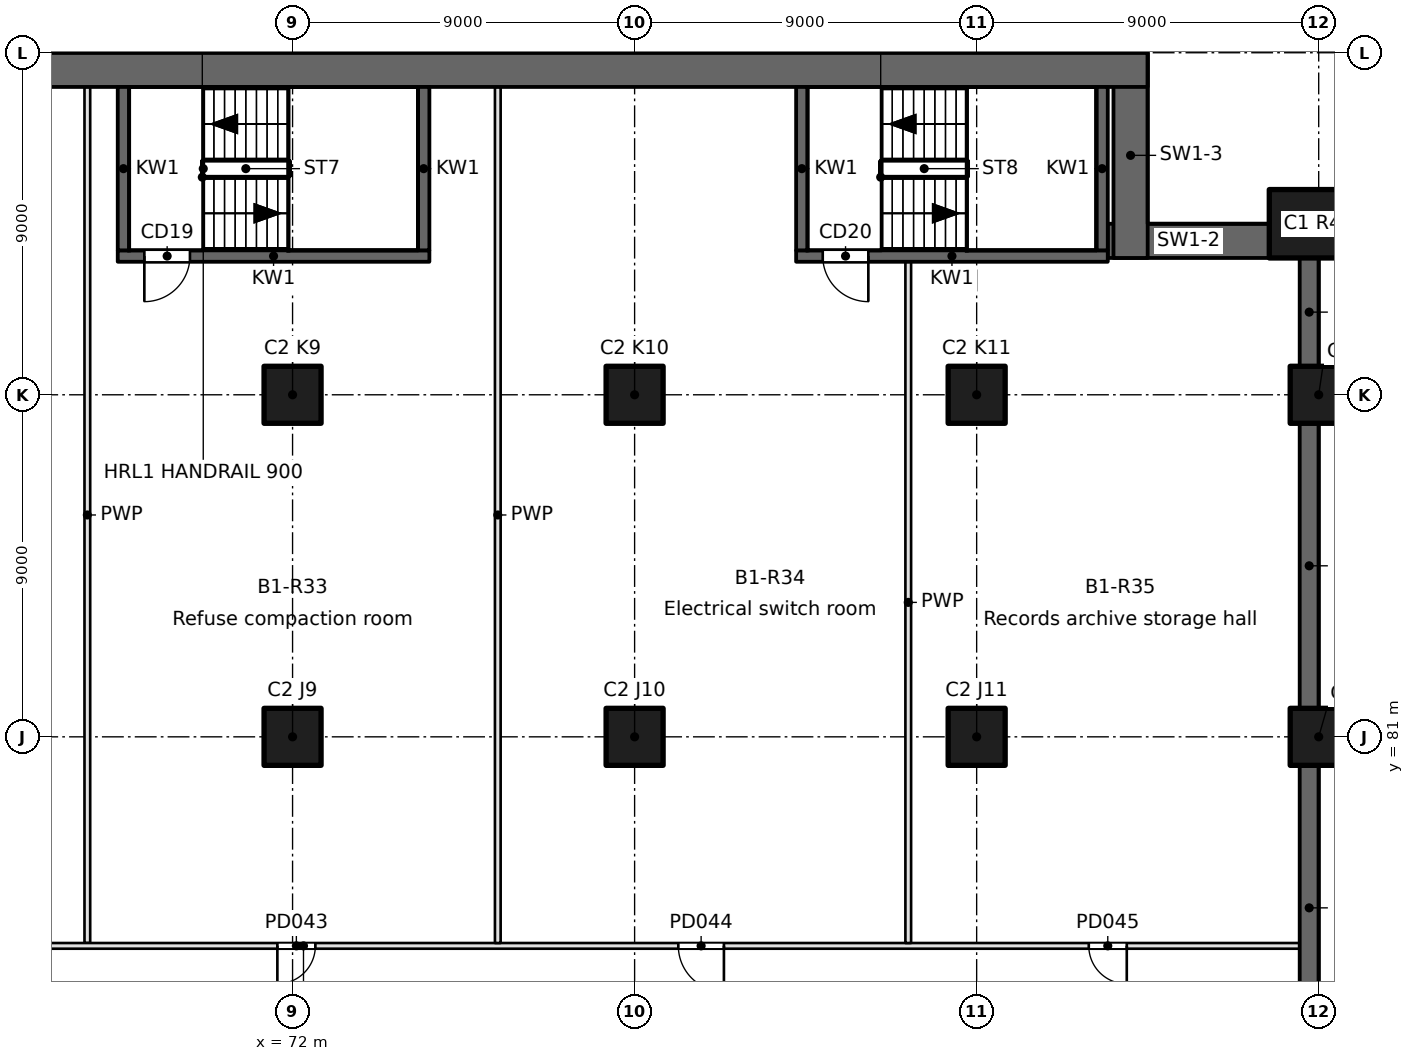
"""IFC4 building model, lengths in metres.
Left out: names, types, materials, properties, quantities, classifications, styles, units other than length and angle.
Written with IfcOpenShell. Run it as: python <this file> out.ifc"""

import sys

from ifc_helpers import new_model, si_unit, direction, frame, frame_2d, origin, origin_2d, place, context, subcontext, project, spatial, rectangle, extrude, element, fill, save


model = new_model("IFC4")
c1 = context("Model", 3, precision=1e-05, world=origin(), true_north=direction((0.0, 1.0)))
c2 = subcontext(c1, "Body", "Model", "MODEL_VIEW")
j1 = project(units=[si_unit("LENGTHUNIT", "METRE"), si_unit("PLANEANGLEUNIT", "RADIAN")], contexts=[c1])
p1 = place(None, origin())
s1 = spatial("IfcSite", under=j1, at=p1, CompositionType="ELEMENT")
p2 = place(p1, origin())
s2 = spatial("IfcBuilding", under=s1, at=p2, CompositionType="ELEMENT")
p3 = place(p2, frame((0.0, 0.0, -6.0)))
s3 = spatial("IfcBuildingStorey", under=s2, at=p3, CompositionType="ELEMENT", Elevation=-6.0)
for number, where, z_axis, x_axis in (
    (1, (99.0, 81.0, -0.6), (0.0, 0.0, 1.0), (1.0, 0.0, 0.0)),
    (2, (99.0, 90.0, -0.6), (0.0, 0.0, 1.0), (1.0, 0.0, 0.0)),
):
    element("IfcColumn", number, at=place(p3, frame(where, z_axis=z_axis, x_axis=x_axis)), inside=s3, PredefinedType="COLUMN", context=c2, shape_type="SweptSolid", body=[
        extrude(rectangle(XDim=1.5, YDim=1.5, at=origin_2d()), origin(), (0.0, 0.0, 1.0), 6.6),
    ])
p4 = place(p3, frame((99.0, 94.5, -0.6), z_axis=(0.0, 0.0, 1.0), x_axis=(1.0, 0.0, 0.0)))
e3 = element("IfcColumn", 3, at=p4, inside=s3, PredefinedType="COLUMN", context=c2, shape_type="SweptSolid", body=[
    extrude(rectangle(XDim=2.6, YDim=1.8, at=origin_2d()), origin(), (0.0, 0.0, 1.0), 6.6),
])
for number, where, z_axis, x_axis in (
    (4, (72.0, 81.0, -0.6), (0.0, 0.0, 1.0), (1.0, 0.0, 0.0)),
    (5, (72.0, 90.0, -0.6), (0.0, 0.0, 1.0), (1.0, 0.0, 0.0)),
    (6, (81.0, 81.0, -0.6), (0.0, 0.0, 1.0), (1.0, 0.0, 0.0)),
    (7, (81.0, 90.0, -0.6), (0.0, 0.0, 1.0), (1.0, 0.0, 0.0)),
    (8, (90.0, 81.0, -0.6), (0.0, 0.0, 1.0), (1.0, 0.0, 0.0)),
    (9, (90.0, 90.0, -0.6), (0.0, 0.0, 1.0), (1.0, 0.0, 0.0)),
):
    element("IfcColumn", number, at=place(p3, frame(where, z_axis=z_axis, x_axis=x_axis)), inside=s3, PredefinedType="COLUMN", context=c2, shape_type="SweptSolid", body=[
        extrude(rectangle(XDim=1.5, YDim=1.5, at=origin_2d()), origin(), (0.0, 0.0, 1.0), 6.6),
    ])
p5 = place(p3, frame((97.7, 94.05, 0.0), z_axis=(0.0, 0.0, 1.0), x_axis=(-1.0, 0.0, 0.0)))
e10 = element("IfcWall", 10, at=p5, inside=s3, PredefinedType="SHEAR", context=c2, shape_type="SweptSolid", body=[
    extrude(rectangle(XDim=4.25, YDim=0.9, at=frame_2d((2.125, 0.0))), origin(), (0.0, 0.0, 1.0), 6.0),
])
p6 = place(p3, frame((94.05, 93.6, 0.0), z_axis=(0.0, 0.0, 1.0), x_axis=(0.0, 1.0, 0.0)))
e11 = element("IfcWall", 11, at=p6, inside=s3, PredefinedType="SHEAR", context=c2, shape_type="SweptSolid", body=[
    extrude(rectangle(XDim=5.4, YDim=0.9, at=frame_2d((2.7, 0.0))), origin(), (0.0, 0.0, 1.0), 6.0),
])
p7 = place(p3, frame((94.5, 98.55, 0.0), z_axis=(0.0, 0.0, 1.0), x_axis=(-1.0, 0.0, 0.0)))
e12 = element("IfcWall", 12, at=p7, inside=s3, PredefinedType="SHEAR", context=c2, shape_type="SweptSolid", body=[
    extrude(rectangle(XDim=90.0, YDim=0.9, at=frame_2d((45.0, 0.0))), origin(), (0.0, 0.0, 1.0), 6.0),
])
p8 = place(p3, frame((67.4, 93.65, 0.0), z_axis=(0.0, 0.0, 1.0), x_axis=(1.0, 0.0, 0.0)))
e13 = element("IfcWall", 13, at=p8, inside=s3, PredefinedType="SOLIDWALL", context=c2, shape_type="SweptSolid", body=[
    extrude(rectangle(XDim=8.2, YDim=0.3, at=frame_2d((4.1, 0.0))), origin(), (0.0, 0.0, 1.0), 5.6),
])
p9 = place(p8, frame((0.7, 0.0, 0.0)))
e14 = element("IfcOpeningElement", 14, at=p9, cuts=e13, PredefinedType="OPENING", context=c2, shape_type="SweptSolid", body=[
    extrude(rectangle(XDim=1.2, YDim=2.1, at=frame_2d((0.6, 1.05))), frame((0.0, 0.15, 0.0), z_axis=(0.0, -1.0, 0.0), x_axis=(1.0, 0.0, 0.0)), (0.0, 0.0, 1.0), 0.3),
])
p10 = place(p3, frame((85.25, 93.65, 0.0), z_axis=(0.0, 0.0, 1.0), x_axis=(1.0, 0.0, 0.0)))
e15 = element("IfcWall", 15, at=p10, inside=s3, PredefinedType="SOLIDWALL", context=c2, shape_type="SweptSolid", body=[
    extrude(rectangle(XDim=8.2, YDim=0.3, at=frame_2d((4.1, 0.0))), origin(), (0.0, 0.0, 1.0), 5.6),
])
p11 = place(p10, frame((0.7, 0.0, 0.0)))
e16 = element("IfcOpeningElement", 16, at=p11, cuts=e15, PredefinedType="OPENING", context=c2, shape_type="SweptSolid", body=[
    extrude(rectangle(XDim=1.2, YDim=2.1, at=frame_2d((0.6, 1.05))), frame((0.0, 0.15, 0.0), z_axis=(0.0, -1.0, 0.0), x_axis=(1.0, 0.0, 0.0)), (0.0, 0.0, 1.0), 0.3),
])
for number, where, z_axis, x_axis in (
    (17, (67.55, 93.8, 0.0), (0.0, 0.0, 1.0), (0.0, 1.0, 0.0)),
    (18, (75.45, 93.8, 0.0), (0.0, 0.0, 1.0), (0.0, 1.0, 0.0)),
    (19, (85.4, 93.8, 0.0), (0.0, 0.0, 1.0), (0.0, 1.0, 0.0)),
    (20, (93.3, 93.8, 0.0), (0.0, 0.0, 1.0), (0.0, 1.0, 0.0)),
):
    element("IfcWall", number, at=place(p3, frame(where, z_axis=z_axis, x_axis=x_axis)), inside=s3, PredefinedType="SOLIDWALL", context=c2, shape_type="SweptSolid", body=[
        extrude(rectangle(XDim=4.3, YDim=0.3, at=frame_2d((2.15, 0.0))), origin(), (0.0, 0.0, 1.0), 5.6),
    ])
for number, where, z_axis, x_axis in (
    (21, (98.75, 72.75, 0.0), (0.0, 0.0, 1.0), (0.0, 1.0, 0.0)),
    (22, (98.75, 81.75, 0.0), (0.0, 0.0, 1.0), (0.0, 1.0, 0.0)),
):
    element("IfcWall", number, at=place(p3, frame(where, z_axis=z_axis, x_axis=x_axis)), inside=s3, PredefinedType="SOLIDWALL", context=c2, shape_type="SweptSolid", body=[
        extrude(rectangle(XDim=7.5, YDim=0.5, at=frame_2d((3.75, 0.0))), origin(), (0.0, 0.0, 1.0), 5.6),
    ])
p12 = place(p3, frame((98.75, 90.75, 0.0), z_axis=(0.0, 0.0, 1.0), x_axis=(0.0, 1.0, 0.0)))
e23 = element("IfcWall", 23, at=p12, inside=s3, PredefinedType="SOLIDWALL", context=c2, shape_type="SweptSolid", body=[
    extrude(rectangle(XDim=2.85, YDim=0.5, at=frame_2d((1.425, 0.0))), origin(), (0.0, 0.0, 1.0), 5.6),
])
p13 = place(p3, frame((66.6, 75.575, 0.0), z_axis=(0.0, 0.0, 1.0), x_axis=(0.0, 1.0, 0.0)))
e24 = element("IfcWall", 24, at=p13, inside=s3, PredefinedType="PARTITIONING", context=c2, shape_type="SweptSolid", body=[
    extrude(rectangle(XDim=22.525, YDim=0.15, at=frame_2d((11.263, 0.0))), origin(), (0.0, 0.0, 1.0), 5.6),
])
p14 = place(p3, frame((98.7, 75.5, 0.0), z_axis=(0.0, 0.0, 1.0), x_axis=(-1.0, 0.0, 0.0)))
e25 = element("IfcWall", 25, at=p14, inside=s3, PredefinedType="PARTITIONING", context=c2, shape_type="SweptSolid", body=[
    extrude(rectangle(XDim=52.825, YDim=0.15, at=frame_2d((26.413, 0.0))), origin(), (0.0, 0.0, 1.0), 5.6),
])
p15 = place(p14, frame((42.075, 0.0, 0.0)))
e26 = element("IfcOpeningElement", 26, at=p15, cuts=e25, PredefinedType="OPENING", context=c2, shape_type="SweptSolid", body=[
    extrude(rectangle(XDim=1.0, YDim=2.1, at=frame_2d((0.5, 1.05))), frame((0.0, 0.075, 0.0), z_axis=(0.0, -1.0, 0.0), x_axis=(1.0, 0.0, 0.0)), (0.0, 0.0, 1.0), 0.15),
])
p16 = place(p14, frame((26.1, 0.0, 0.0)))
e27 = element("IfcOpeningElement", 27, at=p16, cuts=e25, PredefinedType="OPENING", context=c2, shape_type="SweptSolid", body=[
    extrude(rectangle(XDim=1.0, YDim=2.1, at=frame_2d((0.5, 1.05))), frame((0.0, 0.075, 0.0), z_axis=(0.0, -1.0, 0.0), x_axis=(1.0, 0.0, 0.0)), (0.0, 0.0, 1.0), 0.15),
])
p17 = place(p14, frame((15.35, 0.0, 0.0)))
e28 = element("IfcOpeningElement", 28, at=p17, cuts=e25, PredefinedType="OPENING", context=c2, shape_type="SweptSolid", body=[
    extrude(rectangle(XDim=1.2, YDim=2.1, at=frame_2d((0.6, 1.05))), frame((0.0, 0.075, 0.0), z_axis=(0.0, -1.0, 0.0), x_axis=(1.0, 0.0, 0.0)), (0.0, 0.0, 1.0), 0.15),
])
p18 = place(p14, frame((4.75, 0.0, 0.0)))
e29 = element("IfcOpeningElement", 29, at=p18, cuts=e25, PredefinedType="OPENING", context=c2, shape_type="SweptSolid", body=[
    extrude(rectangle(XDim=1.0, YDim=2.1, at=frame_2d((0.5, 1.05))), frame((0.0, 0.075, 0.0), z_axis=(0.0, -1.0, 0.0), x_axis=(1.0, 0.0, 0.0)), (0.0, 0.0, 1.0), 0.15),
])
p19 = place(p3, frame((77.4, 75.575, 0.0), z_axis=(0.0, 0.0, 1.0), x_axis=(0.0, 1.0, 0.0)))
e30 = element("IfcWall", 30, at=p19, inside=s3, PredefinedType="PARTITIONING", context=c2, shape_type="SweptSolid", body=[
    extrude(rectangle(XDim=22.525, YDim=0.15, at=frame_2d((11.263, 0.0))), origin(), (0.0, 0.0, 1.0), 5.6),
])
p20 = place(p3, frame((88.2, 75.575, 0.0), z_axis=(0.0, 0.0, 1.0), x_axis=(0.0, 1.0, 0.0)))
e31 = element("IfcWall", 31, at=p20, inside=s3, PredefinedType="PARTITIONING", context=c2, shape_type="SweptSolid", body=[
    extrude(rectangle(XDim=17.925, YDim=0.15, at=frame_2d((8.962, 0.0))), origin(), (0.0, 0.0, 1.0), 5.6),
])
p21 = place(p9, frame((1.2, 0.0, 0.0), z_axis=(0.0, 0.0, 1.0), x_axis=(-1.0, 0.0, 0.0)))
e32 = element("IfcDoor", 32, at=p21, inside=s3, OperationType="SINGLE_SWING_RIGHT", PredefinedType="DOOR", context=c2, shape_type="SweptSolid", body=[
    extrude(rectangle(XDim=1.2, YDim=2.1, at=frame_2d((0.6, 1.05))), frame((0.0, 0.025, 0.0), z_axis=(0.0, -1.0, 0.0), x_axis=(1.0, 0.0, 0.0)), (0.0, 0.0, 1.0), 0.05),
])
fill(e14, e32)
p22 = place(p11, frame((1.2, 0.0, 0.0), z_axis=(0.0, 0.0, 1.0), x_axis=(-1.0, 0.0, 0.0)))
e33 = element("IfcDoor", 33, at=p22, inside=s3, OperationType="SINGLE_SWING_LEFT", PredefinedType="DOOR", context=c2, shape_type="SweptSolid", body=[
    extrude(rectangle(XDim=1.2, YDim=2.1, at=frame_2d((0.6, 1.05))), frame((0.0, 0.025, 0.0), z_axis=(0.0, -1.0, 0.0), x_axis=(1.0, 0.0, 0.0)), (0.0, 0.0, 1.0), 0.05),
])
fill(e16, e33)
p23 = place(p16, origin())
e34 = element("IfcDoor", 34, at=p23, inside=s3, OperationType="SINGLE_SWING_RIGHT", PredefinedType="DOOR", context=c2, shape_type="SweptSolid", body=[
    extrude(rectangle(XDim=1.0, YDim=2.1, at=frame_2d((0.5, 1.05))), frame((0.0, 0.025, 0.0), z_axis=(0.0, -1.0, 0.0), x_axis=(1.0, 0.0, 0.0)), (0.0, 0.0, 1.0), 0.05),
])
fill(e27, e34)
p24 = place(p17, origin())
e35 = element("IfcDoor", 35, at=p24, inside=s3, OperationType="SINGLE_SWING_LEFT", PredefinedType="DOOR", context=c2, shape_type="SweptSolid", body=[
    extrude(rectangle(XDim=1.2, YDim=2.1, at=frame_2d((0.6, 1.05))), frame((0.0, 0.025, 0.0), z_axis=(0.0, -1.0, 0.0), x_axis=(1.0, 0.0, 0.0)), (0.0, 0.0, 1.0), 0.05),
])
fill(e28, e35)
p25 = place(p18, origin())
e36 = element("IfcDoor", 36, at=p25, inside=s3, OperationType="SINGLE_SWING_LEFT", PredefinedType="DOOR", context=c2, shape_type="SweptSolid", body=[
    extrude(rectangle(XDim=1.0, YDim=2.1, at=frame_2d((0.5, 1.05))), frame((0.0, 0.025, 0.0), z_axis=(0.0, -1.0, 0.0), x_axis=(1.0, 0.0, 0.0)), (0.0, 0.0, 1.0), 0.05),
])
fill(e29, e36)
save(model, sys.argv[1])
